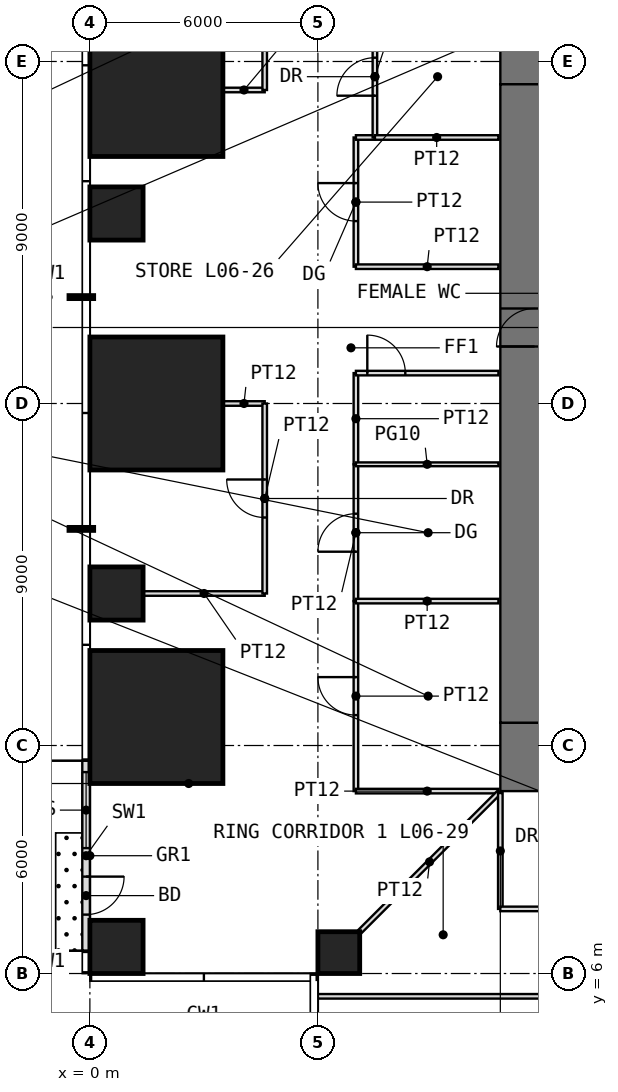
"""IFC4 building model, lengths in metres.
Left out: names, types, materials, properties, quantities, classifications, styles, units other than length and angle.
Written with IfcOpenShell. Run it as: python <this file> out.ifc"""

import sys

from ifc_helpers import new_model, si_unit, direction, frame, frame_2d, origin, origin_2d, place, context, subcontext, project, spatial, rectangle, extrude, element, fill, save


model = new_model("IFC4")
c1 = context("Model", 3, precision=1e-05, world=origin(), true_north=direction((0.0, 1.0)))
c2 = subcontext(c1, "Body", "Model", "MODEL_VIEW")
j1 = project(units=[si_unit("LENGTHUNIT", "METRE"), si_unit("PLANEANGLEUNIT", "RADIAN")], contexts=[c1])
p1 = place(None, origin())
s1 = spatial("IfcSite", under=j1, at=p1, CompositionType="ELEMENT")
p2 = place(p1, origin())
s2 = spatial("IfcBuilding", under=s1, at=p2, CompositionType="ELEMENT")
p3 = place(p2, frame((0.0, 0.0, 30.5)))
s3 = spatial("IfcBuildingStorey", under=s2, at=p3, CompositionType="ELEMENT", Elevation=30.5)
p4 = place(p3, frame((0.7, 6.7, 0.0), z_axis=(0.0, 0.0, 1.0), x_axis=(1.0, 0.0, 0.0)))
e1 = element("IfcColumn", 1, at=p4, inside=s3, PredefinedType="COLUMN", context=c2, shape_type="SweptSolid", body=[
    extrude(rectangle(XDim=1.4, YDim=1.4, at=origin_2d()), origin(), (0.0, 0.0, 1.0), 4.0),
])
p5 = place(p3, frame((6.55, 6.55, 0.0), z_axis=(0.0, 0.0, 1.0), x_axis=(1.0, 0.0, 0.0)))
e2 = element("IfcColumn", 2, at=p5, inside=s3, PredefinedType="COLUMN", context=c2, shape_type="SweptSolid", body=[
    extrude(rectangle(XDim=1.1, YDim=1.1, at=origin_2d()), origin(), (0.0, 0.0, 1.0), 4.0),
])
p6 = place(p3, frame((1.75, 12.75, 0.0), z_axis=(0.0, 0.0, 1.0), x_axis=(1.0, 0.0, 0.0)))
e3 = element("IfcColumn", 3, at=p6, inside=s3, PredefinedType="COLUMN", context=c2, shape_type="SweptSolid", body=[
    extrude(rectangle(XDim=3.5, YDim=3.5, at=origin_2d()), origin(), (0.0, 0.0, 1.0), 4.0),
])
p7 = place(p3, frame((0.7, 16.0, 0.0), z_axis=(0.0, 0.0, 1.0), x_axis=(1.0, 0.0, 0.0)))
e4 = element("IfcColumn", 4, at=p7, inside=s3, PredefinedType="COLUMN", context=c2, shape_type="SweptSolid", body=[
    extrude(rectangle(XDim=1.4, YDim=1.4, at=origin_2d()), origin(), (0.0, 0.0, 1.0), 4.0),
])
p8 = place(p3, frame((1.75, 21.0, 0.0), z_axis=(0.0, 0.0, 1.0), x_axis=(1.0, 0.0, 0.0)))
e5 = element("IfcColumn", 5, at=p8, inside=s3, PredefinedType="COLUMN", context=c2, shape_type="SweptSolid", body=[
    extrude(rectangle(XDim=3.5, YDim=3.5, at=origin_2d()), origin(), (0.0, 0.0, 1.0), 4.0),
])
p9 = place(p3, frame((0.7, 26.0, 0.0), z_axis=(0.0, 0.0, 1.0), x_axis=(1.0, 0.0, 0.0)))
e6 = element("IfcColumn", 6, at=p9, inside=s3, PredefinedType="COLUMN", context=c2, shape_type="SweptSolid", body=[
    extrude(rectangle(XDim=1.4, YDim=1.4, at=origin_2d()), origin(), (0.0, 0.0, 1.0), 4.0),
])
p10 = place(p3, frame((1.75, 29.25, 0.0), z_axis=(0.0, 0.0, 1.0), x_axis=(1.0, 0.0, 0.0)))
e7 = element("IfcColumn", 7, at=p10, inside=s3, PredefinedType="COLUMN", context=c2, shape_type="SweptSolid", body=[
    extrude(rectangle(XDim=3.5, YDim=3.5, at=origin_2d()), origin(), (0.0, 0.0, 1.0), 4.0),
])
p11 = place(p3, frame((-0.1, 11.6, 0.0), z_axis=(0.0, 0.0, 1.0), x_axis=(0.0, -1.0, 0.0)))
e8 = element("IfcWall", 8, at=p11, inside=s3, PredefinedType="USERDEFINED", context=c2, shape_type="SweptSolid", body=[
    extrude(rectangle(XDim=5.0, YDim=0.2, at=frame_2d((2.5, 0.0))), origin(), (0.0, 0.0, 1.0), 3.75),
])
p12 = place(p11, frame((3.05, 0.0, 0.0)))
e9 = element("IfcOpeningElement", 9, at=p12, cuts=e8, PredefinedType="OPENING", context=c2, shape_type="SweptSolid", body=[
    extrude(rectangle(XDim=1.0, YDim=2.4, at=frame_2d((0.5, 1.2))), frame((0.0, 0.11, 0.0), z_axis=(0.0, -1.0, 0.0), x_axis=(1.0, 0.0, 0.0)), (0.0, 0.0, 1.0), 0.22),
])
p13 = place(p11, frame((0.3, 0.0, 0.3)))
e10 = element("IfcOpeningElement", 10, at=p13, cuts=e8, PredefinedType="OPENING", context=c2, shape_type="SweptSolid", body=[
    extrude(rectangle(XDim=2.0, YDim=2.7, at=frame_2d((1.0, 1.35))), frame((0.0, 0.11, 0.0), z_axis=(0.0, -1.0, 0.0), x_axis=(1.0, 0.0, 0.0)), (0.0, 0.0, 1.0), 0.22),
])
p14 = place(p3, frame((10.8, 11.7, -0.05), z_axis=(0.0, 0.0, 1.0), x_axis=(1.0, 0.0, 0.0)))
e11 = element("IfcWall", 11, at=p14, inside=s3, PredefinedType="SHEAR", context=c2, shape_type="SweptSolid", body=[
    extrude(rectangle(XDim=20.4, YDim=1.8, at=frame_2d((10.2, 0.0))), origin(), (0.0, 0.0, 1.0), 4.0),
])
p15 = place(p14, frame((9.2, 0.0, 0.05)))
e12 = element("IfcOpeningElement", 12, at=p15, cuts=e11, PredefinedType="OPENING", context=c2, shape_type="SweptSolid", body=[
    extrude(rectangle(XDim=2.0, YDim=2.2, at=frame_2d((1.0, 1.1))), frame((0.0, 0.91, 0.0), z_axis=(0.0, -1.0, 0.0), x_axis=(1.0, 0.0, 0.0)), (0.0, 0.0, 1.0), 1.82),
])
p16 = place(p3, frame((10.8, 30.3, -0.05), z_axis=(0.0, 0.0, 1.0), x_axis=(1.0, 0.0, 0.0)))
e13 = element("IfcWall", 13, at=p16, inside=s3, PredefinedType="SHEAR", context=c2, shape_type="SweptSolid", body=[
    extrude(rectangle(XDim=20.4, YDim=1.8, at=frame_2d((10.2, 0.0))), origin(), (0.0, 0.0, 1.0), 4.0),
])
p17 = place(p16, frame((9.2, 0.0, 0.05)))
e14 = element("IfcOpeningElement", 14, at=p17, cuts=e13, PredefinedType="OPENING", context=c2, shape_type="SweptSolid", body=[
    extrude(rectangle(XDim=2.0, YDim=2.2, at=frame_2d((1.0, 1.1))), frame((0.0, 0.91, 0.0), z_axis=(0.0, -1.0, 0.0), x_axis=(1.0, 0.0, 0.0)), (0.0, 0.0, 1.0), 1.82),
])
p18 = place(p3, frame((11.7, 12.6, -0.05), z_axis=(0.0, 0.0, 1.0), x_axis=(0.0, 1.0, 0.0)))
e15 = element("IfcWall", 15, at=p18, inside=s3, PredefinedType="SHEAR", context=c2, shape_type="SweptSolid", body=[
    extrude(rectangle(XDim=16.8, YDim=1.8, at=frame_2d((8.4, 0.0))), origin(), (0.0, 0.0, 1.0), 4.0),
])
p19 = place(p18, frame((9.9, 0.0, 0.05)))
e16 = element("IfcOpeningElement", 16, at=p19, cuts=e15, PredefinedType="OPENING", context=c2, shape_type="SweptSolid", body=[
    extrude(rectangle(XDim=1.0, YDim=2.2, at=frame_2d((0.5, 1.1))), frame((0.0, 0.91, 0.0), z_axis=(0.0, -1.0, 0.0), x_axis=(1.0, 0.0, 0.0)), (0.0, 0.0, 1.0), 1.82),
])
p20 = place(p3, frame((1.41, 16.0, 0.0), z_axis=(0.0, 0.0, 1.0), x_axis=(1.0, 0.0, 0.0)))
e17 = element("IfcWall", 17, at=p20, inside=s3, PredefinedType="PARTITIONING", context=c2, shape_type="SweptSolid", body=[
    extrude(rectangle(XDim=3.19, YDim=0.12, at=frame_2d((1.595, 0.0))), origin(), (0.0, 0.0, 1.0), 3.75),
])
for number, where, z_axis, x_axis in (
    (18, (3.51, 21.0, 0.0), (0.0, 0.0, 1.0), (1.0, 0.0, 0.0)),
    (19, (3.51, 29.25, 0.0), (0.0, 0.0, 1.0), (1.0, 0.0, 0.0)),
):
    element("IfcWall", number, at=place(p3, frame(where, z_axis=z_axis, x_axis=x_axis)), inside=s3, PredefinedType="PARTITIONING", context=c2, shape_type="SweptSolid", body=[
        extrude(rectangle(XDim=1.09, YDim=0.12, at=frame_2d((0.545, 0.0))), origin(), (0.0, 0.0, 1.0), 3.75),
    ])
p21 = place(p3, frame((4.6, 16.0, 0.0), z_axis=(0.0, 0.0, 1.0), x_axis=(0.0, 1.0, 0.0)))
e20 = element("IfcWall", 20, at=p21, inside=s3, PredefinedType="PARTITIONING", context=c2, shape_type="SweptSolid", body=[
    extrude(rectangle(XDim=5.0, YDim=0.12, at=frame_2d((2.5, 0.0))), origin(), (0.0, 0.0, 1.0), 3.75),
])
p22 = place(p21, frame((2.0, 0.0, 0.0)))
e21 = element("IfcOpeningElement", 21, at=p22, cuts=e20, PredefinedType="OPENING", context=c2, shape_type="SweptSolid", body=[
    extrude(rectangle(XDim=1.0, YDim=2.2, at=frame_2d((0.5, 1.1))), frame((0.0, 0.07, 0.0), z_axis=(0.0, -1.0, 0.0), x_axis=(1.0, 0.0, 0.0)), (0.0, 0.0, 1.0), 0.14),
])
p23 = place(p3, frame((4.6, 29.25, 0.0), z_axis=(0.0, 0.0, 1.0), x_axis=(0.0, 1.0, 0.0)))
e22 = element("IfcWall", 22, at=p23, inside=s3, PredefinedType="PARTITIONING", context=c2, shape_type="SweptSolid", body=[
    extrude(rectangle(XDim=6.75, YDim=0.12, at=frame_2d((3.375, 0.0))), origin(), (0.0, 0.0, 1.0), 3.75),
])
p24 = place(p23, frame((2.875, 0.0, 0.0)))
e23 = element("IfcOpeningElement", 23, at=p24, cuts=e22, PredefinedType="OPENING", context=c2, shape_type="SweptSolid", body=[
    extrude(rectangle(XDim=1.0, YDim=2.2, at=frame_2d((0.5, 1.1))), frame((0.0, 0.07, 0.0), z_axis=(0.0, -1.0, 0.0), x_axis=(1.0, 0.0, 0.0)), (0.0, 0.0, 1.0), 0.14),
])
p25 = place(p3, frame((6.0, 5.4, 0.0), z_axis=(0.0, 0.0, 1.0), x_axis=(1.0, 0.0, 0.0)))
e24 = element("IfcWall", 24, at=p25, inside=s3, PredefinedType="PARTITIONING", context=c2, shape_type="SweptSolid", body=[
    extrude(rectangle(XDim=27.0, YDim=0.12, at=frame_2d((13.5, 0.0))), origin(), (0.0, 0.0, 1.0), 3.75),
])
p26 = place(p25, frame((14.8, 0.0, 0.0)))
e25 = element("IfcOpeningElement", 25, at=p26, cuts=e24, PredefinedType="OPENING", context=c2, shape_type="SweptSolid", body=[
    extrude(rectangle(XDim=1.0, YDim=2.4, at=frame_2d((0.5, 1.2))), frame((0.0, 0.07, 0.0), z_axis=(0.0, -1.0, 0.0), x_axis=(1.0, 0.0, 0.0)), (0.0, 0.0, 1.0), 0.14),
])
p27 = place(p3, frame((7.0, 10.8, 0.0), z_axis=(0.0, 0.0, 1.0), x_axis=(0.0, 1.0, 0.0)))
e26 = element("IfcWall", 26, at=p27, inside=s3, PredefinedType="PARTITIONING", context=c2, shape_type="SweptSolid", body=[
    extrude(rectangle(XDim=5.0, YDim=0.12, at=frame_2d((2.5, 0.0))), origin(), (0.0, 0.0, 1.0), 3.75),
])
p28 = place(p27, frame((2.0, 0.0, 0.0)))
e27 = element("IfcOpeningElement", 27, at=p28, cuts=e26, PredefinedType="OPENING", context=c2, shape_type="SweptSolid", body=[
    extrude(rectangle(XDim=1.0, YDim=2.2, at=frame_2d((0.5, 1.1))), frame((0.0, 0.07, 0.0), z_axis=(0.0, -1.0, 0.0), x_axis=(1.0, 0.0, 0.0)), (0.0, 0.0, 1.0), 0.14),
])
p29 = place(p3, frame((7.0, 10.8, 0.0), z_axis=(0.0, 0.0, 1.0), x_axis=(1.0, 0.0, 0.0)))
e28 = element("IfcWall", 28, at=p29, inside=s3, PredefinedType="PARTITIONING", context=c2, shape_type="SweptSolid", body=[
    extrude(rectangle(XDim=3.75, YDim=0.12, at=frame_2d((1.875, 0.0))), origin(), (0.0, 0.0, 1.0), 3.75),
])
p30 = place(p3, frame((7.0, 15.8, 0.0), z_axis=(0.0, 0.0, 1.0), x_axis=(0.0, 1.0, 0.0)))
e29 = element("IfcWall", 29, at=p30, inside=s3, PredefinedType="PARTITIONING", context=c2, shape_type="SweptSolid", body=[
    extrude(rectangle(XDim=3.6, YDim=0.12, at=frame_2d((1.8, 0.0))), origin(), (0.0, 0.0, 1.0), 3.75),
])
p31 = place(p30, frame((1.3, 0.0, 0.0)))
e30 = element("IfcOpeningElement", 30, at=p31, cuts=e29, PredefinedType="OPENING", context=c2, shape_type="SweptSolid", body=[
    extrude(rectangle(XDim=1.0, YDim=2.4, at=frame_2d((0.5, 1.2))), frame((0.0, 0.07, 0.0), z_axis=(0.0, -1.0, 0.0), x_axis=(1.0, 0.0, 0.0)), (0.0, 0.0, 1.0), 0.14),
])
p32 = place(p3, frame((7.0, 15.8, 0.0), z_axis=(0.0, 0.0, 1.0), x_axis=(1.0, 0.0, 0.0)))
e31 = element("IfcWall", 31, at=p32, inside=s3, PredefinedType="PARTITIONING", context=c2, shape_type="SweptSolid", body=[
    extrude(rectangle(XDim=3.75, YDim=0.12, at=frame_2d((1.875, 0.0))), origin(), (0.0, 0.0, 1.0), 3.75),
])
p33 = place(p3, frame((7.0, 19.4, 0.0), z_axis=(0.0, 0.0, 1.0), x_axis=(0.0, 1.0, 0.0)))
e32 = element("IfcWall", 32, at=p33, inside=s3, PredefinedType="PARTITIONING", context=c2, shape_type="SweptSolid", body=[
    extrude(rectangle(XDim=2.4, YDim=0.12, at=frame_2d((1.2, 0.0))), origin(), (0.0, 0.0, 1.0), 3.75),
])
p34 = place(p3, frame((7.0, 19.4, 0.0), z_axis=(0.0, 0.0, 1.0), x_axis=(1.0, 0.0, 0.0)))
e33 = element("IfcWall", 33, at=p34, inside=s3, PredefinedType="PARTITIONING", context=c2, shape_type="SweptSolid", body=[
    extrude(rectangle(XDim=3.75, YDim=0.1, at=frame_2d((1.875, 0.0))), origin(), (0.0, 0.0, 1.0), 3.75),
])
p35 = place(p3, frame((7.0, 21.8, 0.0), z_axis=(0.0, 0.0, 1.0), x_axis=(1.0, 0.0, 0.0)))
e34 = element("IfcWall", 34, at=p35, inside=s3, PredefinedType="PARTITIONING", context=c2, shape_type="SweptSolid", body=[
    extrude(rectangle(XDim=3.75, YDim=0.12, at=frame_2d((1.875, 0.0))), origin(), (0.0, 0.0, 1.0), 3.75),
])
p36 = place(p35, frame((0.3, 0.0, 0.0)))
e35 = element("IfcOpeningElement", 35, at=p36, cuts=e34, PredefinedType="OPENING", context=c2, shape_type="SweptSolid", body=[
    extrude(rectangle(XDim=1.0, YDim=2.4, at=frame_2d((0.5, 1.2))), frame((0.0, 0.07, 0.0), z_axis=(0.0, -1.0, 0.0), x_axis=(1.0, 0.0, 0.0)), (0.0, 0.0, 1.0), 0.14),
])
p37 = place(p3, frame((7.0, 24.6, 0.0), z_axis=(0.0, 0.0, 1.0), x_axis=(0.0, 1.0, 0.0)))
e36 = element("IfcWall", 36, at=p37, inside=s3, PredefinedType="PARTITIONING", context=c2, shape_type="SweptSolid", body=[
    extrude(rectangle(XDim=3.4, YDim=0.12, at=frame_2d((1.7, 0.0))), origin(), (0.0, 0.0, 1.0), 3.75),
])
p38 = place(p37, frame((1.2, 0.0, 0.0)))
e37 = element("IfcOpeningElement", 37, at=p38, cuts=e36, PredefinedType="OPENING", context=c2, shape_type="SweptSolid", body=[
    extrude(rectangle(XDim=1.0, YDim=2.4, at=frame_2d((0.5, 1.2))), frame((0.0, 0.07, 0.0), z_axis=(0.0, -1.0, 0.0), x_axis=(1.0, 0.0, 0.0)), (0.0, 0.0, 1.0), 0.14),
])
p39 = place(p3, frame((7.0, 24.6, 0.0), z_axis=(0.0, 0.0, 1.0), x_axis=(1.0, 0.0, 0.0)))
e38 = element("IfcWall", 38, at=p39, inside=s3, PredefinedType="PARTITIONING", context=c2, shape_type="SweptSolid", body=[
    extrude(rectangle(XDim=3.75, YDim=0.12, at=frame_2d((1.875, 0.0))), origin(), (0.0, 0.0, 1.0), 3.75),
])
p40 = place(p3, frame((7.0, 28.0, 0.0), z_axis=(0.0, 0.0, 1.0), x_axis=(1.0, 0.0, 0.0)))
e39 = element("IfcWall", 39, at=p40, inside=s3, PredefinedType="PARTITIONING", context=c2, shape_type="SweptSolid", body=[
    extrude(rectangle(XDim=0.5, YDim=0.12, at=frame_2d((0.25, 0.0))), origin(), (0.0, 0.0, 1.0), 3.75),
])
p41 = place(p3, frame((7.11, 7.11, 0.0), z_axis=(0.0, 0.0, 1.0), x_axis=(0.707106781187, 0.707106781187, 0.0)))
e40 = element("IfcWall", 40, at=p41, inside=s3, PredefinedType="PARTITIONING", context=c2, shape_type="SweptSolid", body=[
    extrude(rectangle(XDim=5.168, YDim=0.12, at=frame_2d((2.584, 0.0))), origin(), (0.0, 0.0, 1.0), 3.75),
])
p42 = place(p3, frame((7.5, 28.0, 0.0), z_axis=(0.0, 0.0, 1.0), x_axis=(0.0, 1.0, 0.0)))
e41 = element("IfcWall", 41, at=p42, inside=s3, PredefinedType="PARTITIONING", context=c2, shape_type="SweptSolid", body=[
    extrude(rectangle(XDim=3.2, YDim=0.12, at=frame_2d((1.6, 0.0))), origin(), (0.0, 0.0, 1.0), 3.75),
])
p43 = place(p42, frame((1.1, 0.0, 0.0)))
e42 = element("IfcOpeningElement", 42, at=p43, cuts=e41, PredefinedType="OPENING", context=c2, shape_type="SweptSolid", body=[
    extrude(rectangle(XDim=1.0, YDim=2.2, at=frame_2d((0.5, 1.1))), frame((0.0, 0.07, 0.0), z_axis=(0.0, -1.0, 0.0), x_axis=(1.0, 0.0, 0.0)), (0.0, 0.0, 1.0), 0.14),
])
p44 = place(p3, frame((7.5, 28.0, 0.0), z_axis=(0.0, 0.0, 1.0), x_axis=(1.0, 0.0, 0.0)))
e43 = element("IfcWall", 43, at=p44, inside=s3, PredefinedType="PARTITIONING", context=c2, shape_type="SweptSolid", body=[
    extrude(rectangle(XDim=3.25, YDim=0.12, at=frame_2d((1.625, 0.0))), origin(), (0.0, 0.0, 1.0), 3.75),
])
p45 = place(p3, frame((10.8, 7.7, 0.0), z_axis=(0.0, 0.0, 1.0), x_axis=(0.0, 1.0, 0.0)))
e44 = element("IfcWall", 44, at=p45, inside=s3, PredefinedType="PARTITIONING", context=c2, shape_type="SweptSolid", body=[
    extrude(rectangle(XDim=3.05, YDim=0.12, at=frame_2d((1.525, 0.0))), origin(), (0.0, 0.0, 1.0), 3.75),
])
p46 = place(p3, frame((10.8, 7.7, 0.0), z_axis=(0.0, 0.0, 1.0), x_axis=(1.0, 0.0, 0.0)))
e45 = element("IfcWall", 45, at=p46, inside=s3, PredefinedType="PARTITIONING", context=c2, shape_type="SweptSolid", body=[
    extrude(rectangle(XDim=3.6, YDim=0.12, at=frame_2d((1.8, 0.0))), origin(), (0.0, 0.0, 1.0), 3.75),
])
p47 = place(p46, frame((1.3, 0.0, 0.0)))
e46 = element("IfcOpeningElement", 46, at=p47, cuts=e45, PredefinedType="OPENING", context=c2, shape_type="SweptSolid", body=[
    extrude(rectangle(XDim=1.0, YDim=2.2, at=frame_2d((0.5, 1.1))), frame((0.0, 0.07, 0.0), z_axis=(0.0, -1.0, 0.0), x_axis=(1.0, 0.0, 0.0)), (0.0, 0.0, 1.0), 0.14),
])
p48 = place(p12, origin())
e47 = element("IfcDoor", 47, at=p48, inside=s3, OperationType="SINGLE_SWING_LEFT", PredefinedType="DOOR", context=c2, shape_type="SweptSolid", body=[
    extrude(rectangle(XDim=1.0, YDim=2.4, at=frame_2d((0.5, 1.2))), frame((0.0, 0.025, 0.0), z_axis=(0.0, -1.0, 0.0), x_axis=(1.0, 0.0, 0.0)), (0.0, 0.0, 1.0), 0.05),
])
fill(e9, e47)
p49 = place(p13, origin())
e48 = element("IfcWindow", 48, at=p49, inside=s3, PartitioningType="SINGLE_PANEL", PredefinedType="WINDOW", context=c2, shape_type="SweptSolid", body=[
    extrude(rectangle(XDim=2.0, YDim=2.7, at=frame_2d((1.0, 1.35))), frame((0.0, 0.03, 0.0), z_axis=(0.0, -1.0, 0.0), x_axis=(1.0, 0.0, 0.0)), (0.0, 0.0, 1.0), 0.06),
])
fill(e10, e48)
p50 = place(p19, origin())
e49 = element("IfcDoor", 49, at=p50, inside=s3, OperationType="SINGLE_SWING_LEFT", PredefinedType="DOOR", context=c2, shape_type="SweptSolid", body=[
    extrude(rectangle(XDim=1.0, YDim=2.2, at=frame_2d((0.5, 1.1))), frame((0.0, 0.025, 0.0), z_axis=(0.0, -1.0, 0.0), x_axis=(1.0, 0.0, 0.0)), (0.0, 0.0, 1.0), 0.05),
])
fill(e16, e49)
p51 = place(p28, origin())
e50 = element("IfcDoor", 50, at=p51, inside=s3, OperationType="SINGLE_SWING_RIGHT", PredefinedType="DOOR", context=c2, shape_type="SweptSolid", body=[
    extrude(rectangle(XDim=1.0, YDim=2.2, at=frame_2d((0.5, 1.1))), frame((0.0, 0.025, 0.0), z_axis=(0.0, -1.0, 0.0), x_axis=(1.0, 0.0, 0.0)), (0.0, 0.0, 1.0), 0.05),
])
fill(e27, e50)
p52 = place(p31, origin())
e51 = element("IfcDoor", 51, at=p52, inside=s3, OperationType="SINGLE_SWING_LEFT", PredefinedType="DOOR", context=c2, shape_type="SweptSolid", body=[
    extrude(rectangle(XDim=1.0, YDim=2.4, at=frame_2d((0.5, 1.2))), frame((0.0, 0.025, 0.0), z_axis=(0.0, -1.0, 0.0), x_axis=(1.0, 0.0, 0.0)), (0.0, 0.0, 1.0), 0.05),
])
fill(e30, e51)
p53 = place(p38, origin())
e52 = element("IfcDoor", 52, at=p53, inside=s3, OperationType="SINGLE_SWING_RIGHT", PredefinedType="DOOR", context=c2, shape_type="SweptSolid", body=[
    extrude(rectangle(XDim=1.0, YDim=2.4, at=frame_2d((0.5, 1.2))), frame((0.0, 0.025, 0.0), z_axis=(0.0, -1.0, 0.0), x_axis=(1.0, 0.0, 0.0)), (0.0, 0.0, 1.0), 0.05),
])
fill(e37, e52)
p54 = place(p43, origin())
e53 = element("IfcDoor", 53, at=p54, inside=s3, OperationType="SINGLE_SWING_LEFT", PredefinedType="DOOR", context=c2, shape_type="SweptSolid", body=[
    extrude(rectangle(XDim=1.0, YDim=2.2, at=frame_2d((0.5, 1.1))), frame((0.0, 0.025, 0.0), z_axis=(0.0, -1.0, 0.0), x_axis=(1.0, 0.0, 0.0)), (0.0, 0.0, 1.0), 0.05),
])
fill(e42, e53)
p55 = place(p22, origin())
e54 = element("IfcDoor", 54, at=p55, inside=s3, OperationType="SINGLE_SWING_RIGHT", PredefinedType="DOOR", context=c2, shape_type="SweptSolid", body=[
    extrude(rectangle(XDim=1.0, YDim=2.2, at=frame_2d((0.5, 1.1))), frame((0.0, 0.025, 0.0), z_axis=(0.0, -1.0, 0.0), x_axis=(1.0, 0.0, 0.0)), (0.0, 0.0, 1.0), 0.05),
])
fill(e21, e54)
p56 = place(p36, origin())
e55 = element("IfcDoor", 55, at=p56, inside=s3, OperationType="SINGLE_SWING_LEFT", PredefinedType="DOOR", context=c2, shape_type="SweptSolid", body=[
    extrude(rectangle(XDim=1.0, YDim=2.4, at=frame_2d((0.5, 1.2))), frame((0.0, 0.025, 0.0), z_axis=(0.0, -1.0, 0.0), x_axis=(1.0, 0.0, 0.0)), (0.0, 0.0, 1.0), 0.05),
])
fill(e35, e55)
save(model, sys.argv[1])
